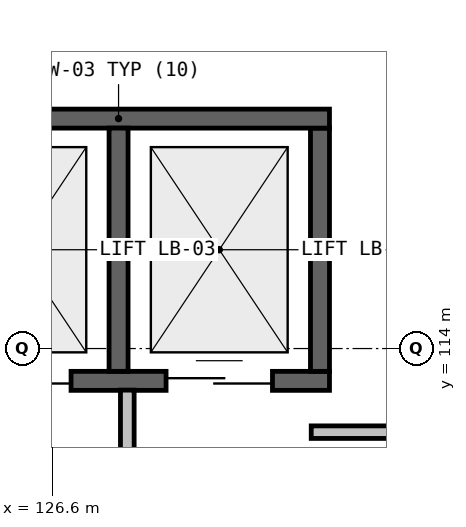
"""IFC4 building model, lengths in metres.
Left out: names, types, materials, properties, quantities, classifications, styles, units other than length and angle.
Written with IfcOpenShell. Run it as: python <this file> out.ifc"""

import sys

from ifc_helpers import new_model, si_unit, direction, frame, frame_2d, origin, place, context, subcontext, project, spatial, rectangle, extrude, element, fill, save


model = new_model("IFC4")
c1 = context("Model", 3, precision=1e-05, world=origin(), true_north=direction((0.0, 1.0)))
c2 = subcontext(c1, "Body", "Model", "MODEL_VIEW")
j1 = project(units=[si_unit("LENGTHUNIT", "METRE"), si_unit("PLANEANGLEUNIT", "RADIAN")], contexts=[c1])
p1 = place(None, origin())
s1 = spatial("IfcSite", under=j1, at=p1, CompositionType="ELEMENT")
p2 = place(p1, origin())
s2 = spatial("IfcBuilding", under=s1, at=p2, CompositionType="ELEMENT")
p3 = place(p2, frame((0.0, 0.0, -4.8)))
s3 = spatial("IfcBuildingStorey", under=s2, at=p3, CompositionType="ELEMENT", Elevation=-4.8)
p4 = place(p3, frame((124.7, 113.575, 0.0), z_axis=(0.0, 0.0, 1.0), x_axis=(1.0, 0.0, 0.0)))
e1 = element("IfcWall", 1, at=p4, inside=s3, PredefinedType="SHEAR", context=c2, shape_type="SweptSolid", body=[
    extrude(rectangle(XDim=5.55, YDim=0.25, at=frame_2d((2.775, 0.0))), origin(), (0.0, 0.0, 1.0), 4.45),
])
p5 = place(p4, frame((0.75, 0.0, 0.0)))
e2 = element("IfcOpeningElement", 2, at=p5, cuts=e1, PredefinedType="OPENING", context=c2, shape_type="SweptSolid", body=[
    extrude(rectangle(XDim=1.4, YDim=2.2, at=frame_2d((0.7, 1.1))), frame((0.0, 0.135, 0.0), z_axis=(0.0, -1.0, 0.0), x_axis=(1.0, 0.0, 0.0)), (0.0, 0.0, 1.0), 0.27),
])
p6 = place(p4, frame((3.4, 0.0, 0.0)))
e3 = element("IfcOpeningElement", 3, at=p6, cuts=e1, PredefinedType="OPENING", context=c2, shape_type="SweptSolid", body=[
    extrude(rectangle(XDim=1.4, YDim=2.2, at=frame_2d((0.7, 1.1))), frame((0.0, 0.135, 0.0), z_axis=(0.0, -1.0, 0.0), x_axis=(1.0, 0.0, 0.0)), (0.0, 0.0, 1.0), 0.27),
])
p7 = place(p3, frame((130.125, 113.7, 0.0), z_axis=(0.0, 0.0, 1.0), x_axis=(0.0, 1.0, 0.0)))
e4 = element("IfcWall", 4, at=p7, inside=s3, PredefinedType="SHEAR", context=c2, shape_type="SweptSolid", body=[
    extrude(rectangle(XDim=3.2, YDim=0.25, at=frame_2d((1.6, 0.0))), origin(), (0.0, 0.0, 1.0), 4.45),
])
p8 = place(p3, frame((130.25, 117.025, 0.0), z_axis=(0.0, 0.0, 1.0), x_axis=(-1.0, 0.0, 0.0)))
e5 = element("IfcWall", 5, at=p8, inside=s3, PredefinedType="SHEAR", context=c2, shape_type="SweptSolid", body=[
    extrude(rectangle(XDim=5.55, YDim=0.25, at=frame_2d((2.775, 0.0))), origin(), (0.0, 0.0, 1.0), 4.45),
])
p9 = place(p3, frame((127.475, 113.7, 0.0), z_axis=(0.0, 0.0, 1.0), x_axis=(0.0, 1.0, 0.0)))
e6 = element("IfcWall", 6, at=p9, inside=s3, PredefinedType="SHEAR", context=c2, shape_type="SweptSolid", body=[
    extrude(rectangle(XDim=3.2, YDim=0.25, at=frame_2d((1.6, 0.0))), origin(), (0.0, 0.0, 1.0), 4.45),
])
p10 = place(p3, frame((127.59, 113.453, 0.0), z_axis=(0.0, 0.0, 1.0), x_axis=(0.0, -1.0, 0.0)))
e7 = element("IfcWall", 7, at=p10, inside=s3, PredefinedType="PARTITIONING", context=c2, shape_type="SweptSolid", body=[
    extrude(rectangle(XDim=3.553, YDim=0.18, at=frame_2d((1.776, 0.0))), origin(), (0.0, 0.0, 1.0), 4.45),
])
p11 = place(p10, frame((1.101, 0.0, 0.0)))
e8 = element("IfcOpeningElement", 8, at=p11, cuts=e7, PredefinedType="OPENING", context=c2, shape_type="SweptSolid", body=[
    extrude(rectangle(XDim=1.35, YDim=2.15, at=frame_2d((0.675, 1.075))), frame((0.0, 0.1, 0.0), z_axis=(0.0, -1.0, 0.0), x_axis=(1.0, 0.0, 0.0)), (0.0, 0.0, 1.0), 0.2),
])
p12 = place(p3, frame((131.914, 112.9, 0.0), z_axis=(0.0, 0.0, 1.0), x_axis=(-1.0, 0.0, 0.0)))
e9 = element("IfcWall", 9, at=p12, inside=s3, PredefinedType="PARTITIONING", context=c2, shape_type="SweptSolid", body=[
    extrude(rectangle(XDim=1.904, YDim=0.165, at=frame_2d((0.952, 0.0))), origin(), (0.0, 0.0, 1.0), 4.45),
])
p13 = place(p5, origin())
e10 = element("IfcDoor", 10, at=p13, inside=s3, OperationType="DOUBLE_DOOR_SLIDING", PredefinedType="DOOR", context=c2, shape_type="SweptSolid", body=[
    extrude(rectangle(XDim=1.4, YDim=2.2, at=frame_2d((0.7, 1.1))), frame((0.0, 0.025, 0.0), z_axis=(0.0, -1.0, 0.0), x_axis=(1.0, 0.0, 0.0)), (0.0, 0.0, 1.0), 0.05),
])
fill(e2, e10)
p14 = place(p6, origin())
e11 = element("IfcDoor", 11, at=p14, inside=s3, OperationType="DOUBLE_DOOR_SLIDING", PredefinedType="DOOR", context=c2, shape_type="SweptSolid", body=[
    extrude(rectangle(XDim=1.4, YDim=2.2, at=frame_2d((0.7, 1.1))), frame((0.0, 0.025, 0.0), z_axis=(0.0, -1.0, 0.0), x_axis=(1.0, 0.0, 0.0)), (0.0, 0.0, 1.0), 0.05),
])
fill(e3, e11)
save(model, sys.argv[1])
